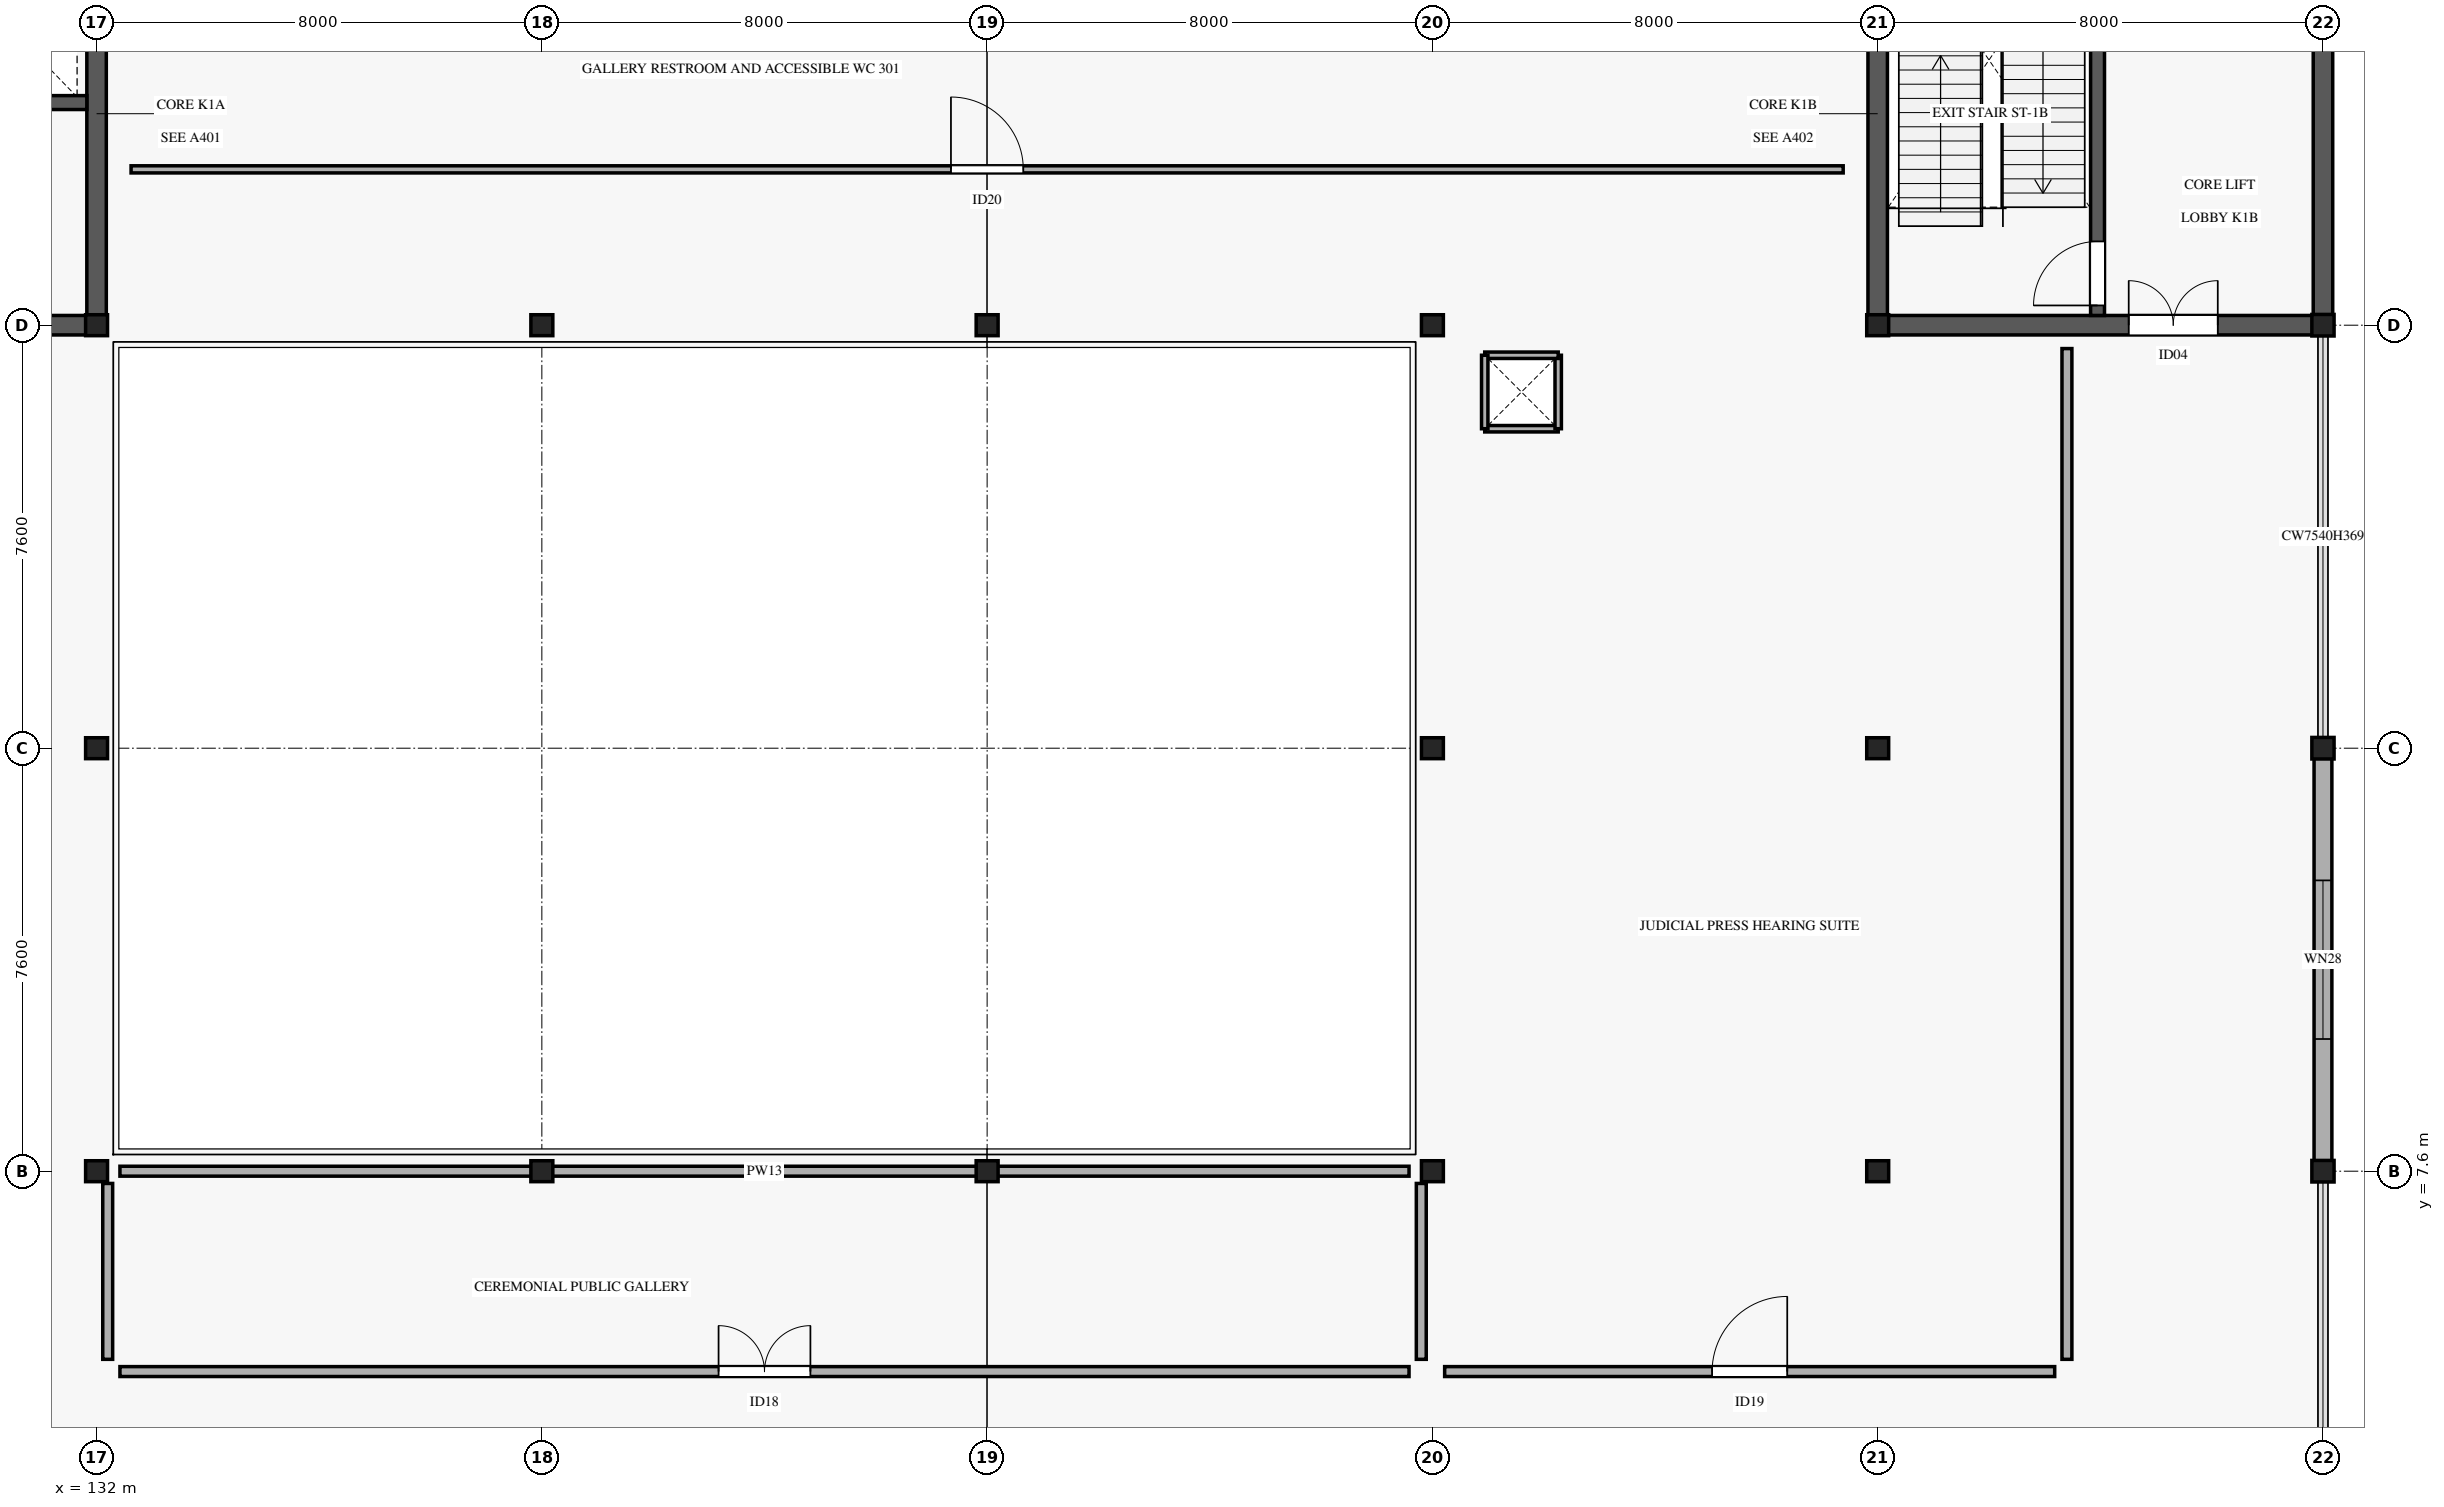
"""IFC4 building model, lengths in metres.
Left out: names, types, materials, properties, quantities, classifications, styles, units other than length and angle.
Written with IfcOpenShell. Run it as: python <this file> out.ifc"""

import sys

from ifc_helpers import new_model, si_unit, direction, frame, frame_2d, origin, origin_2d, place, context, subcontext, project, spatial, rectangle, i_section, extrude, element, fill, save


model = new_model("IFC4")
c1 = context("Model", 3, precision=1e-05, world=origin(), true_north=direction((0.0, 1.0)))
c2 = subcontext(c1, "Body", "Model", "MODEL_VIEW")
j1 = project(units=[si_unit("LENGTHUNIT", "METRE"), si_unit("PLANEANGLEUNIT", "RADIAN")], contexts=[c1])
p1 = place(None, origin())
s1 = spatial("IfcSite", under=j1, at=p1, CompositionType="ELEMENT")
p2 = place(p1, origin())
s2 = spatial("IfcBuilding", under=s1, at=p2, CompositionType="ELEMENT")
p3 = place(p2, frame((0.0, 0.0, 10.8)))
s3 = spatial("IfcBuildingStorey", under=s2, at=p3, CompositionType="ELEMENT", Elevation=10.8)
for number, where, z_axis, x_axis in (
    (1, (132.0, 7.6, 0.0), (0.0, 0.0, 1.0), (1.0, 0.0, 0.0)),
    (2, (132.0, 15.2, 0.0), (0.0, 0.0, 1.0), (1.0, 0.0, 0.0)),
    (3, (132.0, 22.8, 0.0), (0.0, 0.0, 1.0), (1.0, 0.0, 0.0)),
    (4, (140.0, 7.6, 0.0), (0.0, 0.0, 1.0), (1.0, 0.0, 0.0)),
    (5, (140.0, 22.8, 0.0), (0.0, 0.0, 1.0), (1.0, 0.0, 0.0)),
    (6, (148.0, 7.6, 0.0), (0.0, 0.0, 1.0), (1.0, 0.0, 0.0)),
    (7, (148.0, 22.8, 0.0), (0.0, 0.0, 1.0), (1.0, 0.0, 0.0)),
    (8, (156.0, 7.6, 0.0), (0.0, 0.0, 1.0), (1.0, 0.0, 0.0)),
    (9, (156.0, 15.2, 0.0), (0.0, 0.0, 1.0), (1.0, 0.0, 0.0)),
    (10, (156.0, 22.8, 0.0), (0.0, 0.0, 1.0), (1.0, 0.0, 0.0)),
    (11, (164.0, 7.6, 0.0), (0.0, 0.0, 1.0), (1.0, 0.0, 0.0)),
    (12, (164.0, 15.2, 0.0), (0.0, 0.0, 1.0), (1.0, 0.0, 0.0)),
    (13, (164.0, 22.8, 0.0), (0.0, 0.0, 1.0), (1.0, 0.0, 0.0)),
):
    element("IfcColumn", number, at=place(p3, frame(where, z_axis=z_axis, x_axis=x_axis)), inside=s3, PredefinedType="COLUMN", context=c2, shape_type="SweptSolid", body=[
        extrude(i_section(OverallWidth=0.394, OverallDepth=0.376, WebThickness=0.017, FlangeThickness=0.028, FilletRadius=0.015, at=origin_2d()), origin(), (0.0, 0.0, 1.0), 4.59),
    ])
for number, where, z_axis, x_axis in (
    (14, (172.0, 7.6, 0.0), (0.0, 0.0, 1.0), (1.0, 0.0, 0.0)),
    (15, (172.0, 15.2, 0.0), (0.0, 0.0, 1.0), (1.0, 0.0, 0.0)),
    (16, (172.0, 22.8, 0.0), (0.0, 0.0, 1.0), (1.0, 0.0, 0.0)),
):
    element("IfcColumn", number, at=place(p3, frame(where, z_axis=z_axis, x_axis=x_axis)), inside=s3, PredefinedType="COLUMN", context=c2, shape_type="SweptSolid", body=[
        extrude(i_section(OverallWidth=0.399, OverallDepth=0.387, WebThickness=0.021, FlangeThickness=0.033, FilletRadius=0.015, at=origin_2d()), origin(), (0.0, 0.0, 1.0), 4.59),
    ])
p4 = place(p3, frame((172.0, 15.22, 0.0), z_axis=(0.0, 0.0, 1.0), x_axis=(0.0, -1.0, 0.0)))
e17 = element("IfcWall", 17, at=p4, inside=s3, PredefinedType="STANDARD", context=c2, shape_type="SweptSolid", body=[
    extrude(rectangle(XDim=7.64, YDim=0.32, at=frame_2d((3.82, 0.0))), origin(), (0.0, 0.0, 1.0), 3.66),
])
p5 = place(p4, frame((2.395, 0.0, 0.75)))
e18 = element("IfcOpeningElement", 18, at=p5, cuts=e17, PredefinedType="OPENING", context=c2, shape_type="SweptSolid", body=[
    extrude(rectangle(XDim=2.85, YDim=1.55, at=frame_2d((1.425, 0.775))), frame((0.0, 0.17, 0.0), z_axis=(0.0, -1.0, 0.0), x_axis=(1.0, 0.0, 0.0)), (0.0, 0.0, 1.0), 0.34),
])
for number, where, z_axis, x_axis in (
    (19, (156.94, 20.94, 0.0), (0.0, 0.0, 1.0), (1.0, 0.0, 0.0)),
    (20, (158.26, 20.94, 0.0), (0.0, 0.0, 1.0), (0.0, 1.0, 0.0)),
    (21, (158.26, 22.26, 0.0), (0.0, 0.0, 1.0), (-1.0, 0.0, 0.0)),
    (22, (156.94, 22.26, 0.0), (0.0, 0.0, 1.0), (0.0, -1.0, 0.0)),
):
    element("IfcWall", number, at=place(p3, frame(where, z_axis=z_axis, x_axis=x_axis)), inside=s3, PredefinedType="PARTITIONING", context=c2, shape_type="SweptSolid", body=[
        extrude(rectangle(XDim=1.32, YDim=0.115, at=frame_2d((0.66, 0.0))), origin(), (0.0, 0.0, 1.0), 3.75),
    ])
p6 = place(p3, frame((124.225, 22.8, 0.0), z_axis=(0.0, 0.0, 1.0), x_axis=(1.0, 0.0, 0.0)))
e23 = element("IfcWall", 23, at=p6, inside=s3, PredefinedType="SHEAR", context=c2, shape_type="SweptSolid", body=[
    extrude(rectangle(XDim=7.95, YDim=0.35, at=frame_2d((3.975, 0.0))), origin(), (0.0, 0.0, 1.0), 4.59),
])
p7 = place(p6, frame((4.685, 0.0, 0.0)))
e24 = element("IfcOpeningElement", 24, at=p7, cuts=e23, PredefinedType="OPENING", context=c2, shape_type="SweptSolid", body=[
    extrude(rectangle(XDim=1.6, YDim=2.35, at=frame_2d((0.8, 1.175))), frame((0.0, 0.185, 0.0), z_axis=(0.0, -1.0, 0.0), x_axis=(1.0, 0.0, 0.0)), (0.0, 0.0, 1.0), 0.37),
])
p8 = place(p3, frame((132.0, 22.975, 0.0), z_axis=(0.0, 0.0, 1.0), x_axis=(0.0, 1.0, 0.0)))
e25 = element("IfcWall", 25, at=p8, inside=s3, PredefinedType="SHEAR", context=c2, shape_type="SweptSolid", body=[
    extrude(rectangle(XDim=7.25, YDim=0.35, at=frame_2d((3.625, 0.0))), origin(), (0.0, 0.0, 1.0), 4.59),
])
p9 = place(p3, frame((128.475, 26.8, 0.0), z_axis=(0.0, 0.0, 1.0), x_axis=(1.0, 0.0, 0.0)))
e26 = element("IfcWall", 26, at=p9, inside=s3, PredefinedType="SHEAR", context=c2, shape_type="SweptSolid", body=[
    extrude(rectangle(XDim=3.35, YDim=0.25, at=frame_2d((1.675, 0.0))), origin(), (0.0, 0.0, 1.0), 4.59),
])
p10 = place(p9, frame((1.12, 0.0, 0.0)))
e27 = element("IfcOpeningElement", 27, at=p10, cuts=e26, PredefinedType="OPENING", context=c2, shape_type="SweptSolid", body=[
    extrude(rectangle(XDim=1.1, YDim=2.2, at=frame_2d((0.55, 1.1))), frame((0.0, 0.135, 0.0), z_axis=(0.0, -1.0, 0.0), x_axis=(1.0, 0.0, 0.0)), (0.0, 0.0, 1.0), 0.27),
])
p11 = place(p3, frame((163.825, 22.8, 0.0), z_axis=(0.0, 0.0, 1.0), x_axis=(1.0, 0.0, 0.0)))
e28 = element("IfcWall", 28, at=p11, inside=s3, PredefinedType="SHEAR", context=c2, shape_type="SweptSolid", body=[
    extrude(rectangle(XDim=8.35, YDim=0.35, at=frame_2d((4.175, 0.0))), origin(), (0.0, 0.0, 1.0), 4.59),
])
p12 = place(p11, frame((4.685, 0.0, 0.0)))
e29 = element("IfcOpeningElement", 29, at=p12, cuts=e28, PredefinedType="OPENING", context=c2, shape_type="SweptSolid", body=[
    extrude(rectangle(XDim=1.6, YDim=2.35, at=frame_2d((0.8, 1.175))), frame((0.0, 0.185, 0.0), z_axis=(0.0, -1.0, 0.0), x_axis=(1.0, 0.0, 0.0)), (0.0, 0.0, 1.0), 0.37),
])
for number, where, z_axis, x_axis in (
    (30, (164.0, 22.975, 0.0), (0.0, 0.0, 1.0), (0.0, 1.0, 0.0)),
    (31, (172.0, 22.975, 0.0), (0.0, 0.0, 1.0), (0.0, 1.0, 0.0)),
):
    element("IfcWall", number, at=place(p3, frame(where, z_axis=z_axis, x_axis=x_axis)), inside=s3, PredefinedType="SHEAR", context=c2, shape_type="SweptSolid", body=[
        extrude(rectangle(XDim=7.25, YDim=0.35, at=frame_2d((3.625, 0.0))), origin(), (0.0, 0.0, 1.0), 4.59),
    ])
p13 = place(p3, frame((167.95, 22.975, 0.0), z_axis=(0.0, 0.0, 1.0), x_axis=(0.0, 1.0, 0.0)))
e32 = element("IfcWall", 32, at=p13, inside=s3, PredefinedType="SHEAR", context=c2, shape_type="SweptSolid", body=[
    extrude(rectangle(XDim=7.25, YDim=0.25, at=frame_2d((3.625, 0.0))), origin(), (0.0, 0.0, 1.0), 4.59),
])
p14 = place(p13, frame((0.18, 0.0, 0.0)))
e33 = element("IfcOpeningElement", 33, at=p14, cuts=e32, PredefinedType="OPENING", context=c2, shape_type="SweptSolid", body=[
    extrude(rectangle(XDim=1.15, YDim=2.2, at=frame_2d((0.575, 1.1))), frame((0.0, 0.135, 0.0), z_axis=(0.0, -1.0, 0.0), x_axis=(1.0, 0.0, 0.0)), (0.0, 0.0, 1.0), 0.27),
])
p15 = place(p3, frame((132.42, 4.0, 0.0), z_axis=(0.0, 0.0, 1.0), x_axis=(1.0, 0.0, 0.0)))
e34 = element("IfcWall", 34, at=p15, inside=s3, PredefinedType="PARTITIONING", context=c2, shape_type="SweptSolid", body=[
    extrude(rectangle(XDim=23.16, YDim=0.178, at=frame_2d((11.58, 0.0))), origin(), (0.0, 0.0, 1.0), 3.45),
])
p16 = place(p15, frame((10.755, 0.0, 0.0)))
e35 = element("IfcOpeningElement", 35, at=p16, cuts=e34, PredefinedType="OPENING", context=c2, shape_type="SweptSolid", body=[
    extrude(rectangle(XDim=1.65, YDim=2.3, at=frame_2d((0.825, 1.15))), frame((0.0, 0.099, 0.0), z_axis=(0.0, -1.0, 0.0), x_axis=(1.0, 0.0, 0.0)), (0.0, 0.0, 1.0), 0.198),
])
p17 = place(p3, frame((132.2, 4.22, 0.0), z_axis=(0.0, 0.0, 1.0), x_axis=(0.0, 1.0, 0.0)))
e36 = element("IfcWall", 36, at=p17, inside=s3, PredefinedType="PARTITIONING", context=c2, shape_type="SweptSolid", body=[
    extrude(rectangle(XDim=3.16, YDim=0.178, at=frame_2d((1.58, 0.0))), origin(), (0.0, 0.0, 1.0), 3.45),
])
p18 = place(p3, frame((132.42, 7.6, 0.0), z_axis=(0.0, 0.0, 1.0), x_axis=(1.0, 0.0, 0.0)))
e37 = element("IfcWall", 37, at=p18, inside=s3, PredefinedType="PARTITIONING", context=c2, shape_type="SweptSolid", body=[
    extrude(rectangle(XDim=23.16, YDim=0.178, at=frame_2d((11.58, 0.0))), origin(), (0.0, 0.0, 1.0), 3.45),
])
p19 = place(p3, frame((155.8, 4.22, 0.0), z_axis=(0.0, 0.0, 1.0), x_axis=(0.0, 1.0, 0.0)))
e38 = element("IfcWall", 38, at=p19, inside=s3, PredefinedType="PARTITIONING", context=c2, shape_type="SweptSolid", body=[
    extrude(rectangle(XDim=3.16, YDim=0.178, at=frame_2d((1.58, 0.0))), origin(), (0.0, 0.0, 1.0), 3.45),
])
p20 = place(p3, frame((156.22, 4.0, 0.0), z_axis=(0.0, 0.0, 1.0), x_axis=(1.0, 0.0, 0.0)))
e39 = element("IfcWall", 39, at=p20, inside=s3, PredefinedType="PARTITIONING", context=c2, shape_type="SweptSolid", body=[
    extrude(rectangle(XDim=10.96, YDim=0.178, at=frame_2d((5.48, 0.0))), origin(), (0.0, 0.0, 1.0), 3.45),
])
p21 = place(p20, frame((4.805, 0.0, 0.0)))
e40 = element("IfcOpeningElement", 40, at=p21, cuts=e39, PredefinedType="OPENING", context=c2, shape_type="SweptSolid", body=[
    extrude(rectangle(XDim=1.35, YDim=2.25, at=frame_2d((0.675, 1.125))), frame((0.0, 0.099, 0.0), z_axis=(0.0, -1.0, 0.0), x_axis=(1.0, 0.0, 0.0)), (0.0, 0.0, 1.0), 0.198),
])
p22 = place(p3, frame((167.4, 4.22, 0.0), z_axis=(0.0, 0.0, 1.0), x_axis=(0.0, 1.0, 0.0)))
e41 = element("IfcWall", 41, at=p22, inside=s3, PredefinedType="PARTITIONING", context=c2, shape_type="SweptSolid", body=[
    extrude(rectangle(XDim=18.16, YDim=0.178, at=frame_2d((9.08, 0.0))), origin(), (0.0, 0.0, 1.0), 3.45),
])
p23 = place(p3, frame((132.62, 25.6, 0.0), z_axis=(0.0, 0.0, 1.0), x_axis=(1.0, 0.0, 0.0)))
e42 = element("IfcWall", 42, at=p23, inside=s3, PredefinedType="PARTITIONING", context=c2, shape_type="SweptSolid", body=[
    extrude(rectangle(XDim=30.76, YDim=0.128, at=frame_2d((15.38, 0.0))), origin(), (0.0, 0.0, 1.0), 3.45),
])
p24 = place(p23, frame((14.73, 0.0, 0.0)))
e43 = element("IfcOpeningElement", 43, at=p24, cuts=e42, PredefinedType="OPENING", context=c2, shape_type="SweptSolid", body=[
    extrude(rectangle(XDim=1.3, YDim=2.2, at=frame_2d((0.65, 1.1))), frame((0.0, 0.074, 0.0), z_axis=(0.0, -1.0, 0.0), x_axis=(1.0, 0.0, 0.0)), (0.0, 0.0, 1.0), 0.148),
])
p25 = place(p5, origin())
e44 = element("IfcWindow", 44, at=p25, inside=s3, PartitioningType="SINGLE_PANEL", PredefinedType="WINDOW", context=c2, shape_type="SweptSolid", body=[
    extrude(rectangle(XDim=2.85, YDim=1.55, at=frame_2d((1.425, 0.775))), frame((0.0, 0.03, 0.0), z_axis=(0.0, -1.0, 0.0), x_axis=(1.0, 0.0, 0.0)), (0.0, 0.0, 1.0), 0.06),
])
fill(e18, e44)
p26 = place(p14, origin())
e45 = element("IfcDoor", 45, at=p26, inside=s3, OperationType="SINGLE_SWING_LEFT", PredefinedType="DOOR", context=c2, shape_type="SweptSolid", body=[
    extrude(rectangle(XDim=1.15, YDim=2.2, at=frame_2d((0.575, 1.1))), frame((0.0, 0.025, 0.0), z_axis=(0.0, -1.0, 0.0), x_axis=(1.0, 0.0, 0.0)), (0.0, 0.0, 1.0), 0.05),
])
fill(e33, e45)
p27 = place(p12, origin())
e46 = element("IfcDoor", 46, at=p27, inside=s3, OperationType="DOUBLE_DOOR_SINGLE_SWING", PredefinedType="DOOR", context=c2, shape_type="SweptSolid", body=[
    extrude(rectangle(XDim=1.6, YDim=2.35, at=frame_2d((0.8, 1.175))), frame((0.0, 0.025, 0.0), z_axis=(0.0, -1.0, 0.0), x_axis=(1.0, 0.0, 0.0)), (0.0, 0.0, 1.0), 0.05),
])
fill(e29, e46)
p28 = place(p16, origin())
e47 = element("IfcDoor", 47, at=p28, inside=s3, OperationType="DOUBLE_DOOR_SINGLE_SWING", PredefinedType="DOOR", context=c2, shape_type="SweptSolid", body=[
    extrude(rectangle(XDim=1.65, YDim=2.3, at=frame_2d((0.825, 1.15))), frame((0.0, 0.025, 0.0), z_axis=(0.0, -1.0, 0.0), x_axis=(1.0, 0.0, 0.0)), (0.0, 0.0, 1.0), 0.05),
])
fill(e35, e47)
p29 = place(p21, origin())
e48 = element("IfcDoor", 48, at=p29, inside=s3, OperationType="SINGLE_SWING_RIGHT", PredefinedType="DOOR", context=c2, shape_type="SweptSolid", body=[
    extrude(rectangle(XDim=1.35, YDim=2.25, at=frame_2d((0.675, 1.125))), frame((0.0, 0.025, 0.0), z_axis=(0.0, -1.0, 0.0), x_axis=(1.0, 0.0, 0.0)), (0.0, 0.0, 1.0), 0.05),
])
fill(e40, e48)
p30 = place(p24, origin())
e49 = element("IfcDoor", 49, at=p30, inside=s3, OperationType="SINGLE_SWING_LEFT", PredefinedType="DOOR", context=c2, shape_type="SweptSolid", body=[
    extrude(rectangle(XDim=1.3, YDim=2.2, at=frame_2d((0.65, 1.1))), frame((0.0, 0.025, 0.0), z_axis=(0.0, -1.0, 0.0), x_axis=(1.0, 0.0, 0.0)), (0.0, 0.0, 1.0), 0.05),
])
fill(e43, e49)
save(model, sys.argv[1])
